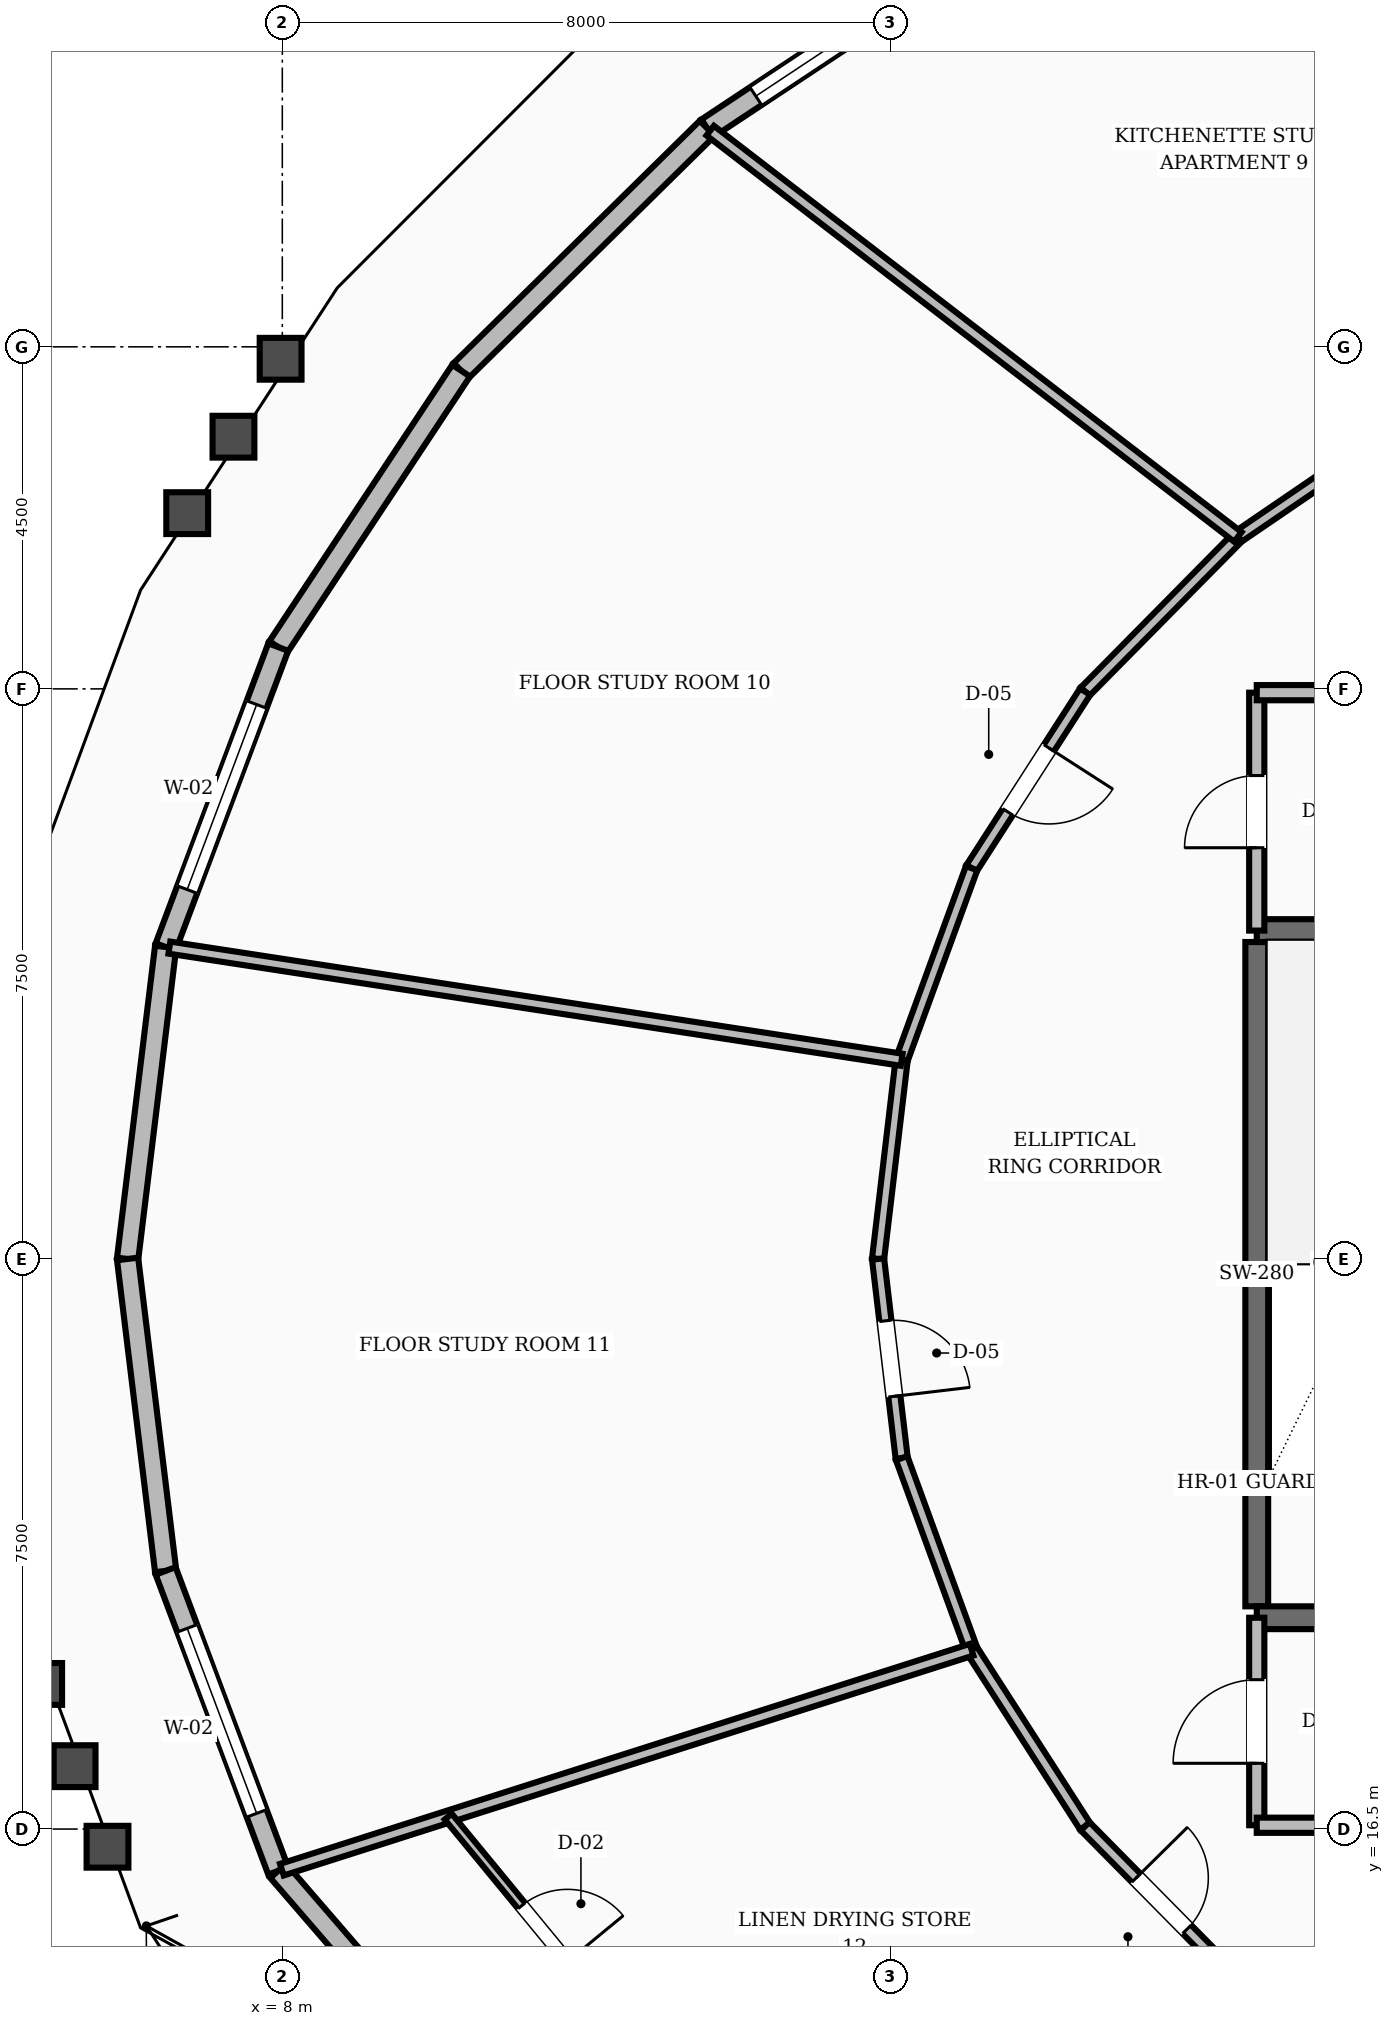
"""IFC4 building model, lengths in metres.
Left out: names, types, materials, properties, quantities, classifications, styles, units other than length and angle.
Written with IfcOpenShell. Run it as: python <this file> out.ifc"""

import sys

from ifc_helpers import new_model, si_unit, direction, frame, frame_2d, origin, place, context, subcontext, project, spatial, rectangle, extrude, element, fill, save


model = new_model("IFC4")
c1 = context("Model", 3, precision=1e-05, world=origin(), true_north=direction((0.0, 1.0)))
c2 = subcontext(c1, "Body", "Model", "MODEL_VIEW")
j1 = project(units=[si_unit("LENGTHUNIT", "METRE"), si_unit("PLANEANGLEUNIT", "RADIAN")], contexts=[c1])
p1 = place(None, origin())
s1 = spatial("IfcSite", under=j1, at=p1, CompositionType="ELEMENT")
p2 = place(p1, origin())
s2 = spatial("IfcBuilding", under=s1, at=p2, CompositionType="ELEMENT")
p3 = place(p2, frame((0.0, 0.0, 41.2)))
s3 = spatial("IfcBuildingStorey", under=s2, at=p3, CompositionType="ELEMENT", Elevation=41.2)
p4 = place(p3, frame((20.82, 19.43, 0.0), z_axis=(0.0, 0.0, 1.0), x_axis=(0.0, 1.0, 0.0)))
e1 = element("IfcWall", 1, at=p4, inside=s3, PredefinedType="SHEAR", context=c2, shape_type="SweptSolid", body=[
    extrude(rectangle(XDim=8.74, YDim=0.3, at=frame_2d((4.37, 0.0))), origin(), (0.0, 0.0, 1.0), 3.6),
])
p5 = place(p3, frame((20.82, 19.28, 0.0), z_axis=(0.0, 0.0, 1.0), x_axis=(1.0, 0.0, 0.0)))
e2 = element("IfcWall", 2, at=p5, inside=s3, PredefinedType="SHEAR", context=c2, shape_type="SweptSolid", body=[
    extrude(rectangle(XDim=3.6, YDim=0.3, at=frame_2d((1.8, 0.0))), origin(), (0.0, 0.0, 1.0), 3.6),
])
p6 = place(p5, frame((1.3, 0.0, 0.0)))
e3 = element("IfcOpeningElement", 3, at=p6, cuts=e2, PredefinedType="OPENING", context=c2, shape_type="SweptSolid", body=[
    extrude(rectangle(XDim=1.1, YDim=2.1, at=frame_2d((0.55, 1.05))), frame((0.0, 0.16, 0.0), z_axis=(0.0, -1.0, 0.0), x_axis=(1.0, 0.0, 0.0)), (0.0, 0.0, 1.0), 0.32),
])
p7 = place(p3, frame((20.82, 28.32, 0.0), z_axis=(0.0, 0.0, 1.0), x_axis=(1.0, 0.0, 0.0)))
e4 = element("IfcWall", 4, at=p7, inside=s3, PredefinedType="SHEAR", context=c2, shape_type="SweptSolid", body=[
    extrude(rectangle(XDim=3.6, YDim=0.3, at=frame_2d((1.8, 0.0))), origin(), (0.0, 0.0, 1.0), 3.6),
])
p8 = place(p3, frame((17.535, 41.49, 0.0), z_axis=(0.0, 0.0, 1.0), x_axis=(-0.833436218894, -0.552615661229, 0.0)))
e5 = element("IfcWall", 5, at=p8, inside=s3, PredefinedType="STANDARD", context=c2, shape_type="SweptSolid", body=[
    extrude(rectangle(XDim=4.734, YDim=0.28, at=frame_2d((2.367, 0.0))), origin(), (0.0, 0.0, 1.0), 2.65),
])
p9 = place(p8, frame((0.767, 0.0, 0.8)))
e6 = element("IfcOpeningElement", 6, at=p9, cuts=e5, PredefinedType="OPENING", context=c2, shape_type="SweptSolid", body=[
    extrude(rectangle(XDim=3.2, YDim=1.65, at=frame_2d((1.6, 0.825))), frame((0.0, 0.15, 0.0), z_axis=(0.0, -1.0, 0.0), x_axis=(1.0, 0.0, 0.0)), (0.0, 0.0, 1.0), 0.3),
])
p10 = place(p3, frame((13.59, 38.874, 0.0), z_axis=(0.0, 0.0, 1.0), x_axis=(-0.712592855148, -0.701577809506, 0.0)))
e7 = element("IfcWall", 7, at=p10, inside=s3, PredefinedType="STANDARD", context=c2, shape_type="SweptSolid", body=[
    extrude(rectangle(XDim=4.544, YDim=0.28, at=frame_2d((2.272, 0.0))), origin(), (0.0, 0.0, 1.0), 2.65),
])
p11 = place(p3, frame((10.352, 35.687, 0.0), z_axis=(0.0, 0.0, 1.0), x_axis=(-0.551763829148, -0.834000405782, 0.0)))
e8 = element("IfcWall", 8, at=p11, inside=s3, PredefinedType="STANDARD", context=c2, shape_type="SweptSolid", body=[
    extrude(rectangle(XDim=4.361, YDim=0.28, at=frame_2d((2.18, 0.0))), origin(), (0.0, 0.0, 1.0), 2.65),
])
p12 = place(p3, frame((7.946, 32.05, 0.0), z_axis=(0.0, 0.0, 1.0), x_axis=(-0.351472537915, -0.936198192207, 0.0)))
e9 = element("IfcWall", 9, at=p12, inside=s3, PredefinedType="STANDARD", context=c2, shape_type="SweptSolid", body=[
    extrude(rectangle(XDim=4.215, YDim=0.28, at=frame_2d((2.107, 0.0))), origin(), (0.0, 0.0, 1.0), 2.65),
])
p13 = place(p12, frame((0.808, 0.0, 0.8)))
e10 = element("IfcOpeningElement", 10, at=p13, cuts=e9, PredefinedType="OPENING", context=c2, shape_type="SweptSolid", body=[
    extrude(rectangle(XDim=2.6, YDim=1.65, at=frame_2d((1.3, 0.825))), frame((0.0, 0.15, 0.0), z_axis=(0.0, -1.0, 0.0), x_axis=(1.0, 0.0, 0.0)), (0.0, 0.0, 1.0), 0.3),
])
for number, where, z_axis, x_axis in (
    (11, (6.465, 28.104, 0.0), (0.0, 0.0, 1.0), (-0.121, -0.993, 0.0)),
    (12, (5.965, 24.0, 0.0), (0.0, 0.0, 1.0), (0.121, -0.993, 0.0)),
):
    element("IfcWall", number, at=place(p3, frame(where, z_axis=z_axis, x_axis=x_axis)), inside=s3, PredefinedType="STANDARD", context=c2, shape_type="SweptSolid", body=[
        extrude(rectangle(XDim=4.134, YDim=0.28, at=frame_2d((2.067, 0.0))), origin(), (0.0, 0.0, 1.0), 2.65),
    ])
p14 = place(p3, frame((6.465, 19.896, 0.0), z_axis=(0.0, 0.0, 1.0), x_axis=(0.351472537915, -0.936198192207, 0.0)))
e13 = element("IfcWall", 13, at=p14, inside=s3, PredefinedType="STANDARD", context=c2, shape_type="SweptSolid", body=[
    extrude(rectangle(XDim=4.215, YDim=0.28, at=frame_2d((2.107, 0.0))), origin(), (0.0, 0.0, 1.0), 2.65),
])
p15 = place(p14, frame((0.808, 0.0, 0.8)))
e14 = element("IfcOpeningElement", 14, at=p15, cuts=e13, PredefinedType="OPENING", context=c2, shape_type="SweptSolid", body=[
    extrude(rectangle(XDim=2.6, YDim=1.65, at=frame_2d((1.3, 0.825))), frame((0.0, 0.15, 0.0), z_axis=(0.0, -1.0, 0.0), x_axis=(1.0, 0.0, 0.0)), (0.0, 0.0, 1.0), 0.3),
])
p16 = place(p3, frame((7.946, 15.95, 0.0), z_axis=(0.0, 0.0, 1.0), x_axis=(0.653570276047, -0.756865836372, 0.0)))
e15 = element("IfcWall", 15, at=p16, inside=s3, PredefinedType="STANDARD", context=c2, shape_type="SweptSolid", body=[
    extrude(rectangle(XDim=4.486, YDim=0.28, at=frame_2d((2.243, 0.0))), origin(), (0.0, 0.0, 1.0), 2.65),
])
p17 = place(p3, frame((20.82, 16.55, 0.0), z_axis=(0.0, 0.0, 1.0), x_axis=(0.0, 1.0, 0.0)))
e16 = element("IfcWall", 16, at=p17, inside=s3, PredefinedType="SOLIDWALL", context=c2, shape_type="SweptSolid", body=[
    extrude(rectangle(XDim=2.73, YDim=0.2, at=frame_2d((1.365, 0.0))), origin(), (0.0, 0.0, 1.0), 2.61),
])
p18 = place(p17, frame((0.815, 0.0, 0.0)))
e17 = element("IfcOpeningElement", 17, at=p18, cuts=e16, PredefinedType="OPENING", context=c2, shape_type="SweptSolid", body=[
    extrude(rectangle(XDim=1.1, YDim=2.1, at=frame_2d((0.55, 1.05))), frame((0.0, 0.11, 0.0), z_axis=(0.0, -1.0, 0.0), x_axis=(1.0, 0.0, 0.0)), (0.0, 0.0, 1.0), 0.22),
])
p19 = place(p3, frame((20.82, 16.55, 0.0), z_axis=(0.0, 0.0, 1.0), x_axis=(1.0, 0.0, 0.0)))
e18 = element("IfcWall", 18, at=p19, inside=s3, PredefinedType="SOLIDWALL", context=c2, shape_type="SweptSolid", body=[
    extrude(rectangle(XDim=3.98, YDim=0.2, at=frame_2d((1.99, 0.0))), origin(), (0.0, 0.0, 1.0), 2.61),
])
p20 = place(p3, frame((20.82, 28.32, 0.0), z_axis=(0.0, 0.0, 1.0), x_axis=(0.0, 1.0, 0.0)))
e19 = element("IfcWall", 19, at=p20, inside=s3, PredefinedType="SOLIDWALL", context=c2, shape_type="SweptSolid", body=[
    extrude(rectangle(XDim=3.13, YDim=0.2, at=frame_2d((1.565, 0.0))), origin(), (0.0, 0.0, 1.0), 2.61),
])
p21 = place(p20, frame((1.09, 0.0, 0.0)))
e20 = element("IfcOpeningElement", 20, at=p21, cuts=e19, PredefinedType="OPENING", context=c2, shape_type="SweptSolid", body=[
    extrude(rectangle(XDim=0.95, YDim=2.1, at=frame_2d((0.475, 1.05))), frame((0.0, 0.11, 0.0), z_axis=(0.0, -1.0, 0.0), x_axis=(1.0, 0.0, 0.0)), (0.0, 0.0, 1.0), 0.22),
])
p22 = place(p3, frame((20.82, 31.45, 0.0), z_axis=(0.0, 0.0, 1.0), x_axis=(1.0, 0.0, 0.0)))
e21 = element("IfcWall", 21, at=p22, inside=s3, PredefinedType="SOLIDWALL", context=c2, shape_type="SweptSolid", body=[
    extrude(rectangle(XDim=3.98, YDim=0.2, at=frame_2d((1.99, 0.0))), origin(), (0.0, 0.0, 1.0), 2.61),
])
p23 = place(p3, frame((23.021, 35.17, 0.0), z_axis=(0.0, 0.0, 1.0), x_axis=(-0.826112340767, -0.563505457323, 0.0)))
e22 = element("IfcWall", 22, at=p23, inside=s3, PredefinedType="SOLIDWALL", context=c2, shape_type="SweptSolid", body=[
    extrude(rectangle(XDim=2.965, YDim=0.16, at=frame_2d((1.482, 0.0))), origin(), (0.0, 0.0, 1.0), 2.61),
])
p24 = place(p3, frame((20.572, 33.499, 0.0), z_axis=(0.0, 0.0, 1.0), x_axis=(-0.702569520063, -0.711615113301, 0.0)))
e23 = element("IfcWall", 23, at=p24, inside=s3, PredefinedType="SOLIDWALL", context=c2, shape_type="SweptSolid", body=[
    extrude(rectangle(XDim=2.861, YDim=0.16, at=frame_2d((1.43, 0.0))), origin(), (0.0, 0.0, 1.0), 2.61),
])
p25 = place(p3, frame((18.562, 31.463, 0.0), z_axis=(0.0, 0.0, 1.0), x_axis=(-0.540891657444, -0.841092274907, 0.0)))
e24 = element("IfcWall", 24, at=p25, inside=s3, PredefinedType="SOLIDWALL", context=c2, shape_type="SweptSolid", body=[
    extrude(rectangle(XDim=2.761, YDim=0.16, at=frame_2d((1.38, 0.0))), origin(), (0.0, 0.0, 1.0), 2.61),
])
p26 = place(p25, frame((0.881, 0.0, 0.0)))
e25 = element("IfcOpeningElement", 25, at=p26, cuts=e24, PredefinedType="OPENING", context=c2, shape_type="SweptSolid", body=[
    extrude(rectangle(XDim=1.0, YDim=2.1, at=frame_2d((0.5, 1.05))), frame((0.0, 0.09, 0.0), z_axis=(0.0, -1.0, 0.0), x_axis=(1.0, 0.0, 0.0)), (0.0, 0.0, 1.0), 0.18),
])
p27 = place(p3, frame((17.068, 29.141, 0.0), z_axis=(0.0, 0.0, 1.0), x_axis=(-0.342882618672, -0.939378257047, 0.0)))
e26 = element("IfcWall", 26, at=p27, inside=s3, PredefinedType="SOLIDWALL", context=c2, shape_type="SweptSolid", body=[
    extrude(rectangle(XDim=2.683, YDim=0.16, at=frame_2d((1.341, 0.0))), origin(), (0.0, 0.0, 1.0), 2.61),
])
p28 = place(p3, frame((16.148, 26.621, 0.0), z_axis=(0.0, 0.0, 1.0), x_axis=(-0.117667763342, -0.993053018459, 0.0)))
e27 = element("IfcWall", 27, at=p28, inside=s3, PredefinedType="SOLIDWALL", context=c2, shape_type="SweptSolid", body=[
    extrude(rectangle(XDim=2.639, YDim=0.16, at=frame_2d((1.32, 0.0))), origin(), (0.0, 0.0, 1.0), 2.61),
])
p29 = place(p3, frame((15.838, 24.0, 0.0), z_axis=(0.0, 0.0, 1.0), x_axis=(0.117667763342, -0.993053018459, 0.0)))
e28 = element("IfcWall", 28, at=p29, inside=s3, PredefinedType="SOLIDWALL", context=c2, shape_type="SweptSolid", body=[
    extrude(rectangle(XDim=2.639, YDim=0.16, at=frame_2d((1.32, 0.0))), origin(), (0.0, 0.0, 1.0), 2.61),
])
p30 = place(p29, frame((0.82, 0.0, 0.0)))
e29 = element("IfcOpeningElement", 29, at=p30, cuts=e28, PredefinedType="OPENING", context=c2, shape_type="SweptSolid", body=[
    extrude(rectangle(XDim=1.0, YDim=2.1, at=frame_2d((0.5, 1.05))), frame((0.0, 0.09, 0.0), z_axis=(0.0, -1.0, 0.0), x_axis=(1.0, 0.0, 0.0)), (0.0, 0.0, 1.0), 0.18),
])
p31 = place(p3, frame((16.148, 21.379, 0.0), z_axis=(0.0, 0.0, 1.0), x_axis=(0.342882618672, -0.939378257047, 0.0)))
e30 = element("IfcWall", 30, at=p31, inside=s3, PredefinedType="SOLIDWALL", context=c2, shape_type="SweptSolid", body=[
    extrude(rectangle(XDim=2.683, YDim=0.16, at=frame_2d((1.341, 0.0))), origin(), (0.0, 0.0, 1.0), 2.61),
])
p32 = place(p3, frame((17.068, 18.859, 0.0), z_axis=(0.0, 0.0, 1.0), x_axis=(0.540891657444, -0.841092274907, 0.0)))
e31 = element("IfcWall", 31, at=p32, inside=s3, PredefinedType="SOLIDWALL", context=c2, shape_type="SweptSolid", body=[
    extrude(rectangle(XDim=2.761, YDim=0.16, at=frame_2d((1.38, 0.0))), origin(), (0.0, 0.0, 1.0), 2.61),
])
p33 = place(p3, frame((18.562, 16.537, 0.0), z_axis=(0.0, 0.0, 1.0), x_axis=(0.702569520063, -0.711615113301, 0.0)))
e32 = element("IfcWall", 32, at=p33, inside=s3, PredefinedType="SOLIDWALL", context=c2, shape_type="SweptSolid", body=[
    extrude(rectangle(XDim=2.861, YDim=0.16, at=frame_2d((1.43, 0.0))), origin(), (0.0, 0.0, 1.0), 2.61),
])
p34 = place(p33, frame((0.955, 0.0, 0.0)))
e33 = element("IfcOpeningElement", 33, at=p34, cuts=e32, PredefinedType="OPENING", context=c2, shape_type="SweptSolid", body=[
    extrude(rectangle(XDim=0.95, YDim=2.1, at=frame_2d((0.475, 1.05))), frame((0.0, 0.09, 0.0), z_axis=(0.0, -1.0, 0.0), x_axis=(1.0, 0.0, 0.0)), (0.0, 0.0, 1.0), 0.18),
])
p35 = place(p3, frame((20.572, 33.499, 0.0), z_axis=(0.0, 0.0, 1.0), x_axis=(-0.792372185587, 0.610037965629, 0.0)))
e34 = element("IfcWall", 34, at=p35, inside=s3, PredefinedType="SOLIDWALL", context=c2, shape_type="SweptSolid", body=[
    extrude(rectangle(XDim=8.761, YDim=0.16, at=frame_2d((4.38, 0.0))), origin(), (0.0, 0.0, 1.0), 2.61),
])
p36 = place(p3, frame((16.148, 26.621, 0.0), z_axis=(0.0, 0.0, 1.0), x_axis=(-0.988476582303, 0.151373862468, 0.0)))
e35 = element("IfcWall", 35, at=p36, inside=s3, PredefinedType="SOLIDWALL", context=c2, shape_type="SweptSolid", body=[
    extrude(rectangle(XDim=9.746, YDim=0.16, at=frame_2d((4.873, 0.0))), origin(), (0.0, 0.0, 1.0), 2.61),
])
p37 = place(p3, frame((17.068, 18.859, 0.0), z_axis=(0.0, 0.0, 1.0), x_axis=(-0.952736741366, -0.303797138978, 0.0)))
e36 = element("IfcWall", 36, at=p37, inside=s3, PredefinedType="SOLIDWALL", context=c2, shape_type="SweptSolid", body=[
    extrude(rectangle(XDim=9.525, YDim=0.16, at=frame_2d((4.762, 0.0))), origin(), (0.0, 0.0, 1.0), 2.61),
])
p38 = place(p3, frame((10.183, 16.663, 0.0), z_axis=(0.0, 0.0, 1.0), x_axis=(0.635342385708, -0.772230569793, 0.0)))
e37 = element("IfcWall", 37, at=p38, inside=s3, PredefinedType="PARTITIONING", context=c2, shape_type="SweptSolid", body=[
    extrude(rectangle(XDim=3.988, YDim=0.12, at=frame_2d((1.994, 0.0))), origin(), (0.0, 0.0, 1.0), 2.61),
])
p39 = place(p38, frame((1.519, 0.0, 0.0)))
e38 = element("IfcOpeningElement", 38, at=p39, cuts=e37, PredefinedType="OPENING", context=c2, shape_type="SweptSolid", body=[
    extrude(rectangle(XDim=0.95, YDim=2.1, at=frame_2d((0.475, 1.05))), frame((0.0, 0.07, 0.0), z_axis=(0.0, -1.0, 0.0), x_axis=(1.0, 0.0, 0.0)), (0.0, 0.0, 1.0), 0.14),
])
p40 = place(p9, origin())
e39 = element("IfcWindow", 39, at=p40, inside=s3, PartitioningType="SINGLE_PANEL", PredefinedType="WINDOW", context=c2, shape_type="SweptSolid", body=[
    extrude(rectangle(XDim=3.2, YDim=1.65, at=frame_2d((1.6, 0.825))), frame((0.0, 0.03, 0.0), z_axis=(0.0, -1.0, 0.0), x_axis=(1.0, 0.0, 0.0)), (0.0, 0.0, 1.0), 0.06),
])
fill(e6, e39)
p41 = place(p13, origin())
e40 = element("IfcWindow", 40, at=p41, inside=s3, PartitioningType="SINGLE_PANEL", PredefinedType="WINDOW", context=c2, shape_type="SweptSolid", body=[
    extrude(rectangle(XDim=2.6, YDim=1.65, at=frame_2d((1.3, 0.825))), frame((0.0, 0.03, 0.0), z_axis=(0.0, -1.0, 0.0), x_axis=(1.0, 0.0, 0.0)), (0.0, 0.0, 1.0), 0.06),
])
fill(e10, e40)
p42 = place(p15, origin())
e41 = element("IfcWindow", 41, at=p42, inside=s3, PartitioningType="SINGLE_PANEL", PredefinedType="WINDOW", context=c2, shape_type="SweptSolid", body=[
    extrude(rectangle(XDim=2.6, YDim=1.65, at=frame_2d((1.3, 0.825))), frame((0.0, 0.03, 0.0), z_axis=(0.0, -1.0, 0.0), x_axis=(1.0, 0.0, 0.0)), (0.0, 0.0, 1.0), 0.06),
])
fill(e14, e41)
p43 = place(p18, origin())
e42 = element("IfcDoor", 42, at=p43, inside=s3, OperationType="SINGLE_SWING_LEFT", PredefinedType="DOOR", context=c2, shape_type="SweptSolid", body=[
    extrude(rectangle(XDim=1.1, YDim=2.1, at=frame_2d((0.55, 1.05))), frame((0.0, 0.025, 0.0), z_axis=(0.0, -1.0, 0.0), x_axis=(1.0, 0.0, 0.0)), (0.0, 0.0, 1.0), 0.05),
])
fill(e17, e42)
p44 = place(p21, origin())
e43 = element("IfcDoor", 43, at=p44, inside=s3, OperationType="SINGLE_SWING_LEFT", PredefinedType="DOOR", context=c2, shape_type="SweptSolid", body=[
    extrude(rectangle(XDim=0.95, YDim=2.1, at=frame_2d((0.475, 1.05))), frame((0.0, 0.025, 0.0), z_axis=(0.0, -1.0, 0.0), x_axis=(1.0, 0.0, 0.0)), (0.0, 0.0, 1.0), 0.05),
])
fill(e20, e43)
p45 = place(p26, origin())
e44 = element("IfcDoor", 44, at=p45, inside=s3, OperationType="SINGLE_SWING_LEFT", PredefinedType="DOOR", context=c2, shape_type="SweptSolid", body=[
    extrude(rectangle(XDim=1.0, YDim=2.1, at=frame_2d((0.5, 1.05))), frame((0.0, 0.025, 0.0), z_axis=(0.0, -1.0, 0.0), x_axis=(1.0, 0.0, 0.0)), (0.0, 0.0, 1.0), 0.05),
])
fill(e25, e44)
p46 = place(p30, origin())
e45 = element("IfcDoor", 45, at=p46, inside=s3, OperationType="SINGLE_SWING_RIGHT", PredefinedType="DOOR", context=c2, shape_type="SweptSolid", body=[
    extrude(rectangle(XDim=1.0, YDim=2.1, at=frame_2d((0.5, 1.05))), frame((0.0, 0.025, 0.0), z_axis=(0.0, -1.0, 0.0), x_axis=(1.0, 0.0, 0.0)), (0.0, 0.0, 1.0), 0.05),
])
fill(e29, e45)
p47 = place(p34, origin())
e46 = element("IfcDoor", 46, at=p47, inside=s3, OperationType="SINGLE_SWING_LEFT", PredefinedType="DOOR", context=c2, shape_type="SweptSolid", body=[
    extrude(rectangle(XDim=0.95, YDim=2.1, at=frame_2d((0.475, 1.05))), frame((0.0, 0.025, 0.0), z_axis=(0.0, -1.0, 0.0), x_axis=(1.0, 0.0, 0.0)), (0.0, 0.0, 1.0), 0.05),
])
fill(e33, e46)
p48 = place(p39, origin())
e47 = element("IfcDoor", 47, at=p48, inside=s3, OperationType="SINGLE_SWING_RIGHT", PredefinedType="DOOR", context=c2, shape_type="SweptSolid", body=[
    extrude(rectangle(XDim=0.95, YDim=2.1, at=frame_2d((0.475, 1.05))), frame((0.0, 0.025, 0.0), z_axis=(0.0, -1.0, 0.0), x_axis=(1.0, 0.0, 0.0)), (0.0, 0.0, 1.0), 0.05),
])
fill(e38, e47)
save(model, sys.argv[1])
